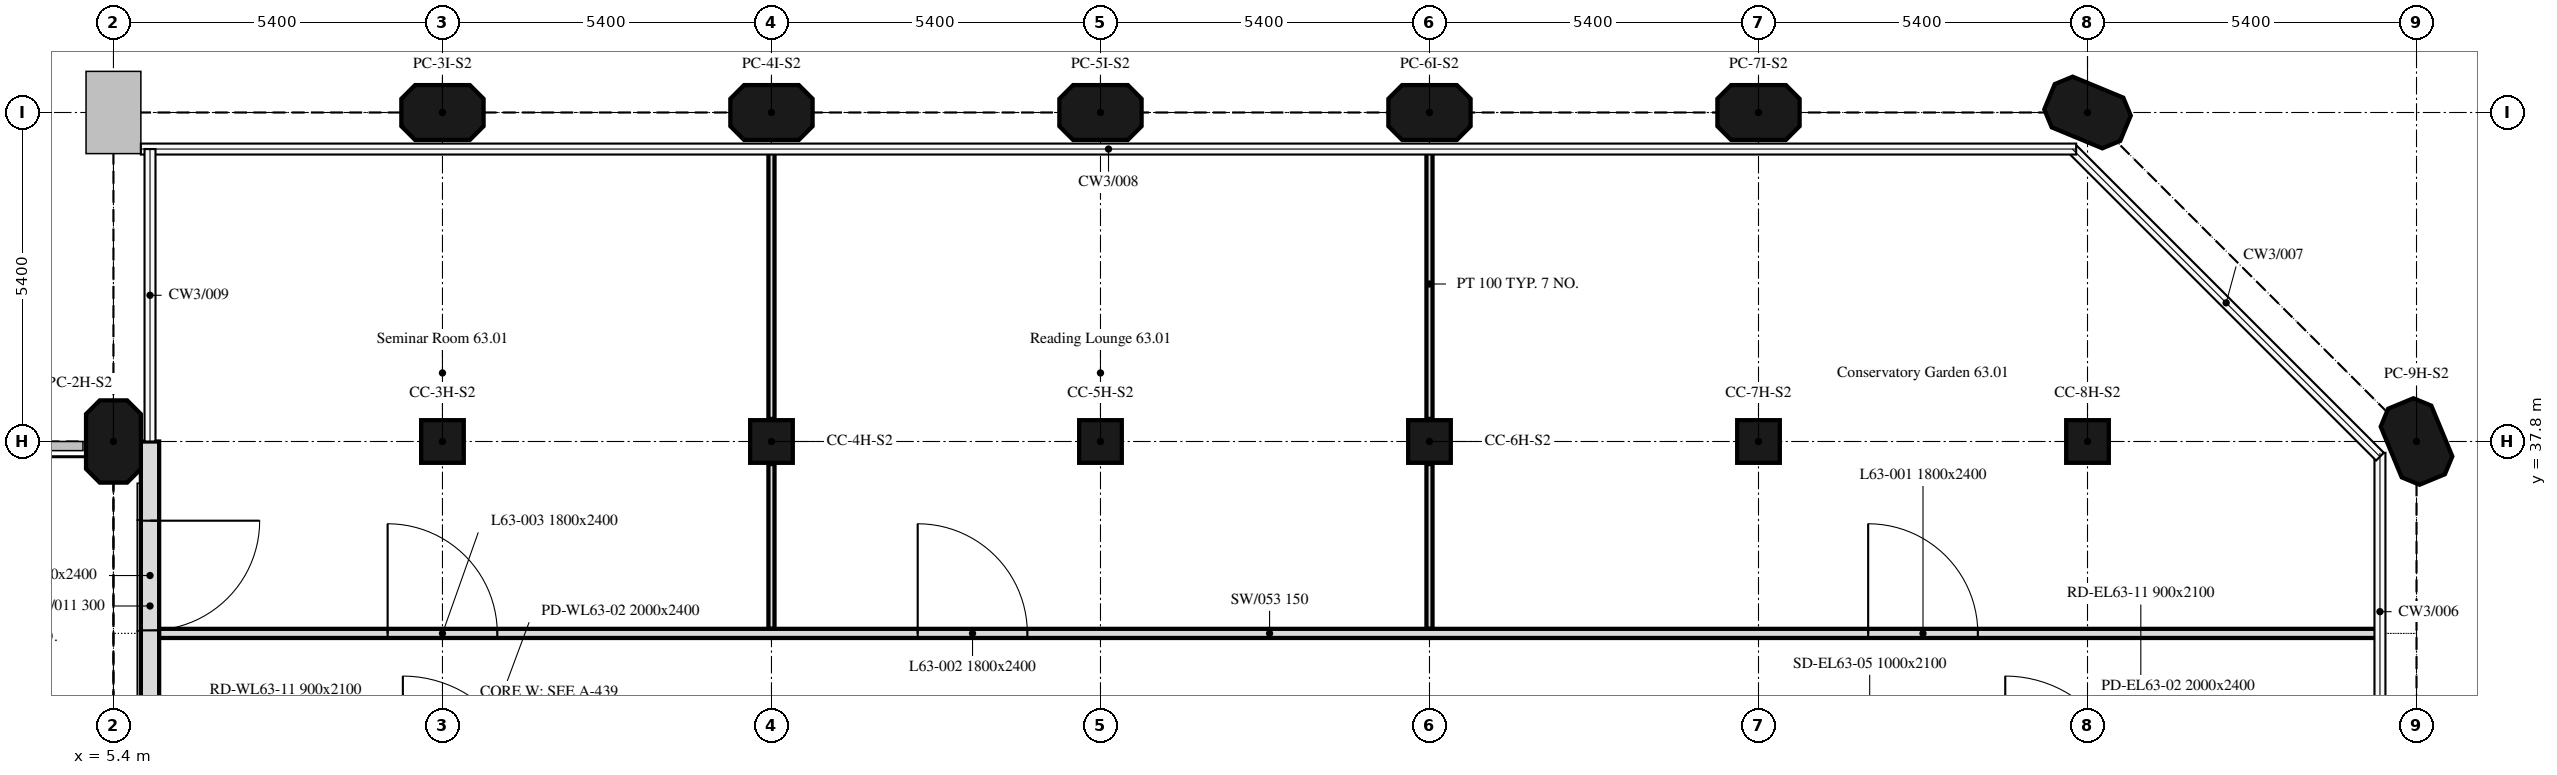
"""IFC4 building model, lengths in metres.
Left out: names, types, materials, properties, quantities, classifications, styles, units other than length and angle.
Written with IfcOpenShell. Run it as: python <this file> out.ifc"""

import sys

from ifc_helpers import new_model, si_unit, direction, frame, frame_2d, origin, origin_2d, place, context, subcontext, project, spatial, polyline, rectangle, outline, extrude, element, fill, save


model = new_model("IFC4")
c1 = context("Model", 3, precision=1e-05, world=origin(), true_north=direction((0.0, 1.0)))
c2 = subcontext(c1, "Body", "Model", "MODEL_VIEW")
j1 = project(units=[si_unit("LENGTHUNIT", "METRE"), si_unit("PLANEANGLEUNIT", "RADIAN")], contexts=[c1])
p1 = place(None, origin())
s1 = spatial("IfcSite", under=j1, at=p1, CompositionType="ELEMENT")
p2 = place(p1, origin())
s2 = spatial("IfcBuilding", under=s1, at=p2, CompositionType="ELEMENT")
p3 = place(p2, frame((0.0, 0.0, 260.5)))
s3 = spatial("IfcBuildingStorey", under=s2, at=p3, CompositionType="ELEMENT", Elevation=260.5)
p4 = place(p3, frame((5.4, 37.8, 0.0), z_axis=(0.0, 0.0, 1.0), x_axis=(0.0, 1.0, 0.0)))
e1 = element("IfcColumn", 1, at=p4, inside=s3, PredefinedType="COLUMN", context=c2, shape_type="SweptSolid", body=[
    extrude(outline(polyline([(-0.45, -0.45), (0.45, -0.45), (0.675, -0.225), (0.675, 0.225), (0.45, 0.45), (-0.45, 0.45), (-0.675, 0.225), (-0.675, -0.225), (-0.45, -0.45)])), origin(), (0.0, 0.0, 1.0), 4.5),
])
for number, where, z_axis, x_axis in (
    (2, (10.8, 37.8, 0.0), (0.0, 0.0, 1.0), (1.0, 0.0, 0.0)),
    (3, (16.2, 37.8, 0.0), (0.0, 0.0, 1.0), (1.0, 0.0, 0.0)),
    (4, (21.6, 37.8, 0.0), (0.0, 0.0, 1.0), (1.0, 0.0, 0.0)),
    (5, (27.0, 37.8, 0.0), (0.0, 0.0, 1.0), (1.0, 0.0, 0.0)),
    (6, (32.4, 37.8, 0.0), (0.0, 0.0, 1.0), (1.0, 0.0, 0.0)),
    (7, (37.8, 37.8, 0.0), (0.0, 0.0, 1.0), (1.0, 0.0, 0.0)),
):
    element("IfcColumn", number, at=place(p3, frame(where, z_axis=z_axis, x_axis=x_axis)), inside=s3, PredefinedType="COLUMN", context=c2, shape_type="SweptSolid", body=[
        extrude(rectangle(XDim=0.7, YDim=0.7, at=origin_2d()), origin(), (0.0, 0.0, 1.0), 4.5),
    ])
for number, where, z_axis, x_axis in (
    (8, (43.2, 37.8, 0.0), (0.0, 0.0, 1.0), (-0.383, 0.924, 0.0)),
    (9, (10.8, 43.2, 0.0), (0.0, 0.0, 1.0), (1.0, 0.0, 0.0)),
    (10, (16.2, 43.2, 0.0), (0.0, 0.0, 1.0), (1.0, 0.0, 0.0)),
    (11, (21.6, 43.2, 0.0), (0.0, 0.0, 1.0), (1.0, 0.0, 0.0)),
    (12, (27.0, 43.2, 0.0), (0.0, 0.0, 1.0), (1.0, 0.0, 0.0)),
    (13, (32.4, 43.2, 0.0), (0.0, 0.0, 1.0), (1.0, 0.0, 0.0)),
    (14, (37.8, 43.2, 0.0), (0.0, 0.0, 1.0), (-0.924, 0.383, 0.0)),
):
    element("IfcColumn", number, at=place(p3, frame(where, z_axis=z_axis, x_axis=x_axis)), inside=s3, PredefinedType="COLUMN", context=c2, shape_type="SweptSolid", body=[
        extrude(outline(polyline([(-0.45, -0.45), (0.45, -0.45), (0.675, -0.225), (0.675, 0.225), (0.45, 0.45), (-0.45, 0.45), (-0.675, 0.225), (-0.675, -0.225), (-0.45, -0.45)])), origin(), (0.0, 0.0, 1.0), 4.5),
    ])
p5 = place(p3, frame((6.0, 37.8, 0.0), z_axis=(0.0, 0.0, 1.0), x_axis=(0.0, -1.0, 0.0)))
e15 = element("IfcWall", 15, at=p5, inside=s3, PredefinedType="SOLIDWALL", context=c2, shape_type="SweptSolid", body=[
    extrude(rectangle(XDim=5.4, YDim=0.3, at=frame_2d((2.7, 0.0))), origin(), (0.0, 0.0, 1.0), 4.5),
])
p6 = place(p5, frame((1.3, 0.0, 0.0)))
e16 = element("IfcOpeningElement", 16, at=p6, cuts=e15, PredefinedType="OPENING", context=c2, shape_type="SweptSolid", body=[
    extrude(rectangle(XDim=1.8, YDim=2.4, at=frame_2d((0.9, 1.2))), frame((0.0, 0.16, 0.0), z_axis=(0.0, -1.0, 0.0), x_axis=(1.0, 0.0, 0.0)), (0.0, 0.0, 1.0), 0.32),
])
p7 = place(p3, frame((27.0, 42.6, 0.0), z_axis=(0.0, 0.0, 1.0), x_axis=(0.0, -1.0, 0.0)))
e17 = element("IfcWall", 17, at=p7, inside=s3, PredefinedType="PARTITIONING", context=c2, shape_type="SweptSolid", body=[
    extrude(rectangle(XDim=4.43, YDim=0.1, at=frame_2d((2.215, 0.0))), origin(), (0.0, 0.0, 1.0), 4.5),
])
p8 = place(p3, frame((27.0, 37.43, 0.0), z_axis=(0.0, 0.0, 1.0), x_axis=(0.0, -1.0, 0.0)))
e18 = element("IfcWall", 18, at=p8, inside=s3, PredefinedType="PARTITIONING", context=c2, shape_type="SweptSolid", body=[
    extrude(rectangle(XDim=2.705, YDim=0.1, at=frame_2d((1.353, 0.0))), origin(), (0.0, 0.0, 1.0), 4.5),
])
p9 = place(p3, frame((16.2, 42.6, 0.0), z_axis=(0.0, 0.0, 1.0), x_axis=(0.0, -1.0, 0.0)))
e19 = element("IfcWall", 19, at=p9, inside=s3, PredefinedType="PARTITIONING", context=c2, shape_type="SweptSolid", body=[
    extrude(rectangle(XDim=4.43, YDim=0.1, at=frame_2d((2.215, 0.0))), origin(), (0.0, 0.0, 1.0), 4.5),
])
p10 = place(p3, frame((16.2, 37.43, 0.0), z_axis=(0.0, 0.0, 1.0), x_axis=(0.0, -1.0, 0.0)))
e20 = element("IfcWall", 20, at=p10, inside=s3, PredefinedType="PARTITIONING", context=c2, shape_type="SweptSolid", body=[
    extrude(rectangle(XDim=2.705, YDim=0.1, at=frame_2d((1.353, 0.0))), origin(), (0.0, 0.0, 1.0), 4.5),
])
p11 = place(p3, frame((6.151, 34.65, 0.0), z_axis=(0.0, 0.0, 1.0), x_axis=(1.0, 0.0, 0.0)))
e21 = element("IfcWall", 21, at=p11, inside=s3, PredefinedType="PARTITIONING", context=c2, shape_type="SweptSolid", body=[
    extrude(rectangle(XDim=36.449, YDim=0.15, at=frame_2d((18.225, 0.0))), origin(), (0.0, 0.0, 1.0), 4.5),
])
p12 = place(p11, frame((28.049, 0.0, 0.0)))
e22 = element("IfcOpeningElement", 22, at=p12, cuts=e21, PredefinedType="OPENING", context=c2, shape_type="SweptSolid", body=[
    extrude(rectangle(XDim=1.8, YDim=2.4, at=frame_2d((0.9, 1.2))), frame((0.0, 0.075, 0.0), z_axis=(0.0, -1.0, 0.0), x_axis=(1.0, 0.0, 0.0)), (0.0, 0.0, 1.0), 0.15),
])
p13 = place(p11, frame((12.449, 0.0, 0.0)))
e23 = element("IfcOpeningElement", 23, at=p13, cuts=e21, PredefinedType="OPENING", context=c2, shape_type="SweptSolid", body=[
    extrude(rectangle(XDim=1.8, YDim=2.4, at=frame_2d((0.9, 1.2))), frame((0.0, 0.075, 0.0), z_axis=(0.0, -1.0, 0.0), x_axis=(1.0, 0.0, 0.0)), (0.0, 0.0, 1.0), 0.15),
])
p14 = place(p11, frame((3.749, 0.0, 0.0)))
e24 = element("IfcOpeningElement", 24, at=p14, cuts=e21, PredefinedType="OPENING", context=c2, shape_type="SweptSolid", body=[
    extrude(rectangle(XDim=1.8, YDim=2.4, at=frame_2d((0.9, 1.2))), frame((0.0, 0.075, 0.0), z_axis=(0.0, -1.0, 0.0), x_axis=(1.0, 0.0, 0.0)), (0.0, 0.0, 1.0), 0.15),
])
p15 = place(p6, origin())
e25 = element("IfcDoor", 25, at=p15, inside=s3, OperationType="DOUBLE_DOOR_DOUBLE_SWING", PredefinedType="DOOR", context=c2, shape_type="SweptSolid", body=[
    extrude(rectangle(XDim=1.8, YDim=2.4, at=frame_2d((0.9, 1.2))), frame((0.0, 0.025, 0.0), z_axis=(0.0, -1.0, 0.0), x_axis=(1.0, 0.0, 0.0)), (0.0, 0.0, 1.0), 0.05),
])
fill(e16, e25)
p16 = place(p12, origin())
e26 = element("IfcDoor", 26, at=p16, inside=s3, OperationType="DOUBLE_DOOR_SINGLE_SWING", PredefinedType="DOOR", context=c2, shape_type="SweptSolid", body=[
    extrude(rectangle(XDim=1.8, YDim=2.4, at=frame_2d((0.9, 1.2))), frame((0.0, 0.025, 0.0), z_axis=(0.0, -1.0, 0.0), x_axis=(1.0, 0.0, 0.0)), (0.0, 0.0, 1.0), 0.05),
])
fill(e22, e26)
p17 = place(p13, origin())
e27 = element("IfcDoor", 27, at=p17, inside=s3, OperationType="DOUBLE_DOOR_SINGLE_SWING", PredefinedType="DOOR", context=c2, shape_type="SweptSolid", body=[
    extrude(rectangle(XDim=1.8, YDim=2.4, at=frame_2d((0.9, 1.2))), frame((0.0, 0.025, 0.0), z_axis=(0.0, -1.0, 0.0), x_axis=(1.0, 0.0, 0.0)), (0.0, 0.0, 1.0), 0.05),
])
fill(e23, e27)
p18 = place(p14, origin())
e28 = element("IfcDoor", 28, at=p18, inside=s3, OperationType="DOUBLE_DOOR_SINGLE_SWING", PredefinedType="DOOR", context=c2, shape_type="SweptSolid", body=[
    extrude(rectangle(XDim=1.8, YDim=2.4, at=frame_2d((0.9, 1.2))), frame((0.0, 0.025, 0.0), z_axis=(0.0, -1.0, 0.0), x_axis=(1.0, 0.0, 0.0)), (0.0, 0.0, 1.0), 0.05),
])
fill(e24, e28)
save(model, sys.argv[1])
